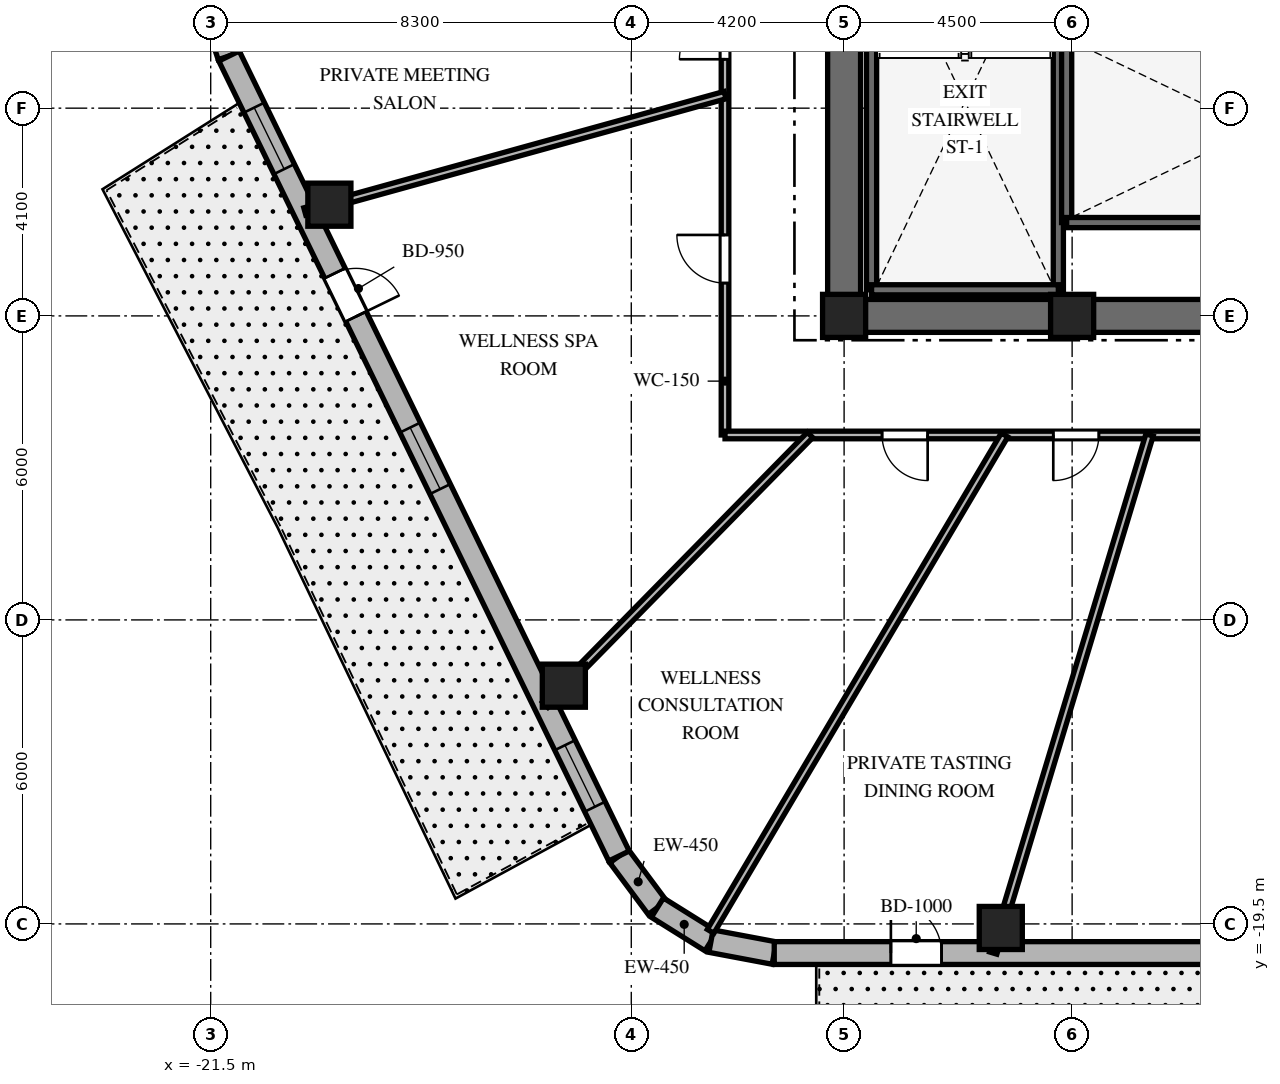
"""IFC4 building model, lengths in metres.
Left out: names, types, materials, properties, quantities, classifications, styles, units other than length and angle.
Written with IfcOpenShell. Run it as: python <this file> out.ifc"""

import sys

from ifc_helpers import new_model, si_unit, direction, frame, frame_2d, origin, origin_2d, place, context, subcontext, project, spatial, rectangle, extrude, element, fill, save


model = new_model("IFC4")
c1 = context("Model", 3, precision=1e-05, world=origin(), true_north=direction((0.0, 1.0)))
c2 = subcontext(c1, "Body", "Model", "MODEL_VIEW")
j1 = project(units=[si_unit("LENGTHUNIT", "METRE"), si_unit("PLANEANGLEUNIT", "RADIAN")], contexts=[c1])
p1 = place(None, origin())
s1 = spatial("IfcSite", under=j1, at=p1, CompositionType="ELEMENT")
p2 = place(p1, origin())
s2 = spatial("IfcBuilding", under=s1, at=p2, CompositionType="ELEMENT")
p3 = place(p2, frame((0.0, 0.0, 280.8)))
s3 = spatial("IfcBuildingStorey", under=s2, at=p3, CompositionType="ELEMENT", Elevation=280.8)
p4 = place(p3, frame((-9.325, -7.5, 0.0), z_axis=(0.0, 0.0, 1.0), x_axis=(1.0, 0.0, 0.0)))
e1 = element("IfcWall", 1, at=p4, inside=s3, PredefinedType="SHEAR", context=c2, shape_type="SweptSolid", body=[
    extrude(rectangle(XDim=18.65, YDim=0.65, at=frame_2d((9.325, 0.0))), origin(), (0.0, 0.0, 1.0), 3.9),
])
p5 = place(p4, frame((9.375, 0.0, 0.0)))
e2 = element("IfcOpeningElement", 2, at=p5, cuts=e1, PredefinedType="OPENING", context=c2, shape_type="SweptSolid", body=[
    extrude(rectangle(XDim=1.0, YDim=2.15, at=frame_2d((0.5, 1.075))), frame((0.0, 0.335, 0.0), z_axis=(0.0, -1.0, 0.0), x_axis=(1.0, 0.0, 0.0)), (0.0, 0.0, 1.0), 0.67),
])
p6 = place(p3, frame((-9.0, -7.175, 0.0), z_axis=(0.0, 0.0, 1.0), x_axis=(0.0, 1.0, 0.0)))
e3 = element("IfcWall", 3, at=p6, inside=s3, PredefinedType="SHEAR", context=c2, shape_type="SweptSolid", body=[
    extrude(rectangle(XDim=14.35, YDim=0.65, at=frame_2d((7.175, 0.0))), origin(), (0.0, 0.0, 1.0), 3.9),
])
p7 = place(p6, frame((10.3, 0.0, 0.0)))
e4 = element("IfcOpeningElement", 4, at=p7, cuts=e3, PredefinedType="OPENING", context=c2, shape_type="SweptSolid", body=[
    extrude(rectangle(XDim=1.05, YDim=2.15, at=frame_2d((0.525, 1.075))), frame((0.0, 0.335, 0.0), z_axis=(0.0, -1.0, 0.0), x_axis=(1.0, 0.0, 0.0)), (0.0, 0.0, 1.0), 0.67),
])
for number, where, z_axis, x_axis in (
    (5, (-8.458, -6.985, 0.0), (0.0, 0.0, 1.0), (0.0, 1.0, 0.0)),
    (6, (-4.772, -6.985, 0.0), (0.0, 0.0, 1.0), (0.0, 1.0, 0.0)),
):
    element("IfcWall", number, at=place(p3, frame(where, z_axis=z_axis, x_axis=x_axis)), inside=s3, PredefinedType="SHEAR", context=c2, shape_type="SweptSolid", body=[
        extrude(rectangle(XDim=9.143, YDim=0.2, at=frame_2d((4.572, 0.0))), origin(), (0.0, 0.0, 1.0), 3.9),
    ])
for number, where, z_axis, x_axis in (
    (7, (-8.458, -6.985, 0.0), (0.0, 0.0, 1.0), (1.0, 0.0, 0.0)),
    (8, (-4.608, -5.658, 0.0), (0.0, 0.0, 1.0), (0.0, 1.0, 0.0)),
):
    element("IfcWall", number, at=place(p3, frame(where, z_axis=z_axis, x_axis=x_axis)), inside=s3, PredefinedType="SHEAR", context=c2, shape_type="SweptSolid", body=[
        extrude(rectangle(XDim=3.686, YDim=0.2, at=frame_2d((1.843, 0.0))), origin(), (0.0, 0.0, 1.0), 3.9),
    ])
p8 = place(p3, frame((-4.608, -5.658, 0.0), z_axis=(0.0, 0.0, 1.0), x_axis=(1.0, 0.0, 0.0)))
e9 = element("IfcWall", 9, at=p8, inside=s3, PredefinedType="SHEAR", context=c2, shape_type="SweptSolid", body=[
    extrude(rectangle(XDim=9.166, YDim=0.2, at=frame_2d((4.583, 0.0))), origin(), (0.0, 0.0, 1.0), 3.9),
])
p9 = place(p8, frame((7.45, 0.0, 0.0)))
e10 = element("IfcOpeningElement", 10, at=p9, cuts=e9, PredefinedType="OPENING", context=c2, shape_type="SweptSolid", body=[
    extrude(rectangle(XDim=1.0, YDim=2.15, at=frame_2d((0.5, 1.075))), frame((0.0, 0.11, 0.0), z_axis=(0.0, -1.0, 0.0), x_axis=(1.0, 0.0, 0.0)), (0.0, 0.0, 1.0), 0.22),
])
for number, where, z_axis, x_axis in (
    (11, (-9.0, -7.5, 0.0), (0.0, 0.0, 1.0), (1.0, 0.0, 0.0)),
    (12, (-4.5, -7.5, 0.0), (0.0, 0.0, 1.0), (1.0, 0.0, 0.0)),
    (13, (-5.908, -19.58, 0.0), (0.0, 0.0, 1.0), (1.0, 0.0, 0.0)),
    (14, (-19.158, -5.305, 0.0), (0.0, 0.0, 1.0), (1.0, 0.0, 0.0)),
    (15, (-14.531, -14.798, 0.0), (0.0, 0.0, 1.0), (1.0, 0.0, 0.0)),
):
    element("IfcColumn", number, at=place(p3, frame(where, z_axis=z_axis, x_axis=x_axis)), inside=s3, PredefinedType="COLUMN", context=c2, shape_type="SweptSolid", body=[
        extrude(rectangle(XDim=0.85, YDim=0.85, at=origin_2d()), origin(), (0.0, 0.0, 1.0), 3.9),
    ])
p10 = place(p3, frame((-13.443, -18.16, 0.0), z_axis=(0.0, 0.0, 1.0), x_axis=(0.597042425808, -0.802209661987, 0.0)))
e16 = element("IfcWall", 16, at=p10, inside=s3, PredefinedType="SOLIDWALL", context=c2, shape_type="SweptSolid", body=[
    extrude(rectangle(XDim=1.27, YDim=0.45, at=frame_2d((0.635, 0.0))), origin(), (0.0, 0.0, 1.0), 3.6),
])
p11 = place(p3, frame((-12.685, -19.178, 0.0), z_axis=(0.0, 0.0, 1.0), x_axis=(0.848031272749, -0.529946186362, 0.0)))
e17 = element("IfcWall", 17, at=p11, inside=s3, PredefinedType="SOLIDWALL", context=c2, shape_type="SweptSolid", body=[
    extrude(rectangle(XDim=1.248, YDim=0.45, at=frame_2d((0.624, 0.0))), origin(), (0.0, 0.0, 1.0), 3.6),
])
p12 = place(p3, frame((-11.626, -19.84, 0.0), z_axis=(0.0, 0.0, 1.0), x_axis=(0.982701956681, -0.185194126083, 0.0)))
e18 = element("IfcWall", 18, at=p12, inside=s3, PredefinedType="SOLIDWALL", context=c2, shape_type="SweptSolid", body=[
    extrude(rectangle(XDim=1.27, YDim=0.45, at=frame_2d((0.635, 0.0))), origin(), (0.0, 0.0, 1.0), 3.6),
])
p13 = place(p3, frame((-21.422, -1.522, 0.0), z_axis=(0.0, 0.0, 1.0), x_axis=(0.316964162323, -0.94843751497, 0.0)))
e19 = element("IfcWall", 19, at=p13, inside=s3, PredefinedType="SOLIDWALL", context=c2, shape_type="SweptSolid", body=[
    extrude(rectangle(XDim=0.895, YDim=0.45, at=frame_2d((0.448, 0.0))), origin(), (0.0, 0.0, 1.0), 3.6),
])
p14 = place(p3, frame((-10.379, -20.075, 0.0), z_axis=(0.0, 0.0, 1.0), x_axis=(1.0, 0.0, 0.0)))
e20 = element("IfcWall", 20, at=p14, inside=s3, PredefinedType="SOLIDWALL", context=c2, shape_type="SweptSolid", body=[
    extrude(rectangle(XDim=22.417, YDim=0.45, at=frame_2d((11.208, 0.0))), origin(), (0.0, 0.0, 1.0), 3.6),
])
p15 = place(p14, frame((2.302, 0.0, 0.0)))
e21 = element("IfcOpeningElement", 21, at=p15, cuts=e20, PredefinedType="OPENING", context=c2, shape_type="SweptSolid", body=[
    extrude(rectangle(XDim=1.0, YDim=2.15, at=frame_2d((0.5, 1.075))), frame((0.0, 0.235, 0.0), z_axis=(0.0, -1.0, 0.0), x_axis=(1.0, 0.0, 0.0)), (0.0, 0.0, 1.0), 0.47),
])
p16 = place(p14, frame((10.534, 0.0, 0.8)))
e22 = element("IfcOpeningElement", 22, at=p16, cuts=e20, PredefinedType="OPENING", context=c2, shape_type="SweptSolid", body=[
    extrude(rectangle(XDim=1.35, YDim=1.75, at=frame_2d((0.675, 0.875))), frame((0.0, 0.235, 0.0), z_axis=(0.0, -1.0, 0.0), x_axis=(1.0, 0.0, 0.0)), (0.0, 0.0, 1.0), 0.47),
])
p17 = place(p14, frame((19.587, 0.0, 0.8)))
e23 = element("IfcOpeningElement", 23, at=p17, cuts=e20, PredefinedType="OPENING", context=c2, shape_type="SweptSolid", body=[
    extrude(rectangle(XDim=1.35, YDim=1.75, at=frame_2d((0.675, 0.875))), frame((0.0, 0.235, 0.0), z_axis=(0.0, -1.0, 0.0), x_axis=(1.0, 0.0, 0.0)), (0.0, 0.0, 1.0), 0.47),
])
p18 = place(p3, frame((-21.138, -2.371, 0.0), z_axis=(0.0, 0.0, 1.0), x_axis=(0.438128124058, -0.89891253574, 0.0)))
e24 = element("IfcWall", 24, at=p18, inside=s3, PredefinedType="SOLIDWALL", context=c2, shape_type="SweptSolid", body=[
    extrude(rectangle(XDim=17.565, YDim=0.45, at=frame_2d((8.782, 0.0))), origin(), (0.0, 0.0, 1.0), 3.6),
])
p19 = place(p18, frame((4.769, 0.0, 0.0)))
e25 = element("IfcOpeningElement", 25, at=p19, cuts=e24, PredefinedType="OPENING", context=c2, shape_type="SweptSolid", body=[
    extrude(rectangle(XDim=0.95, YDim=2.15, at=frame_2d((0.475, 1.075))), frame((0.0, 0.235, 0.0), z_axis=(0.0, -1.0, 0.0), x_axis=(1.0, 0.0, 0.0)), (0.0, 0.0, 1.0), 0.47),
])
p20 = place(p18, frame((1.133, 0.0, 0.8)))
e26 = element("IfcOpeningElement", 26, at=p20, cuts=e24, PredefinedType="OPENING", context=c2, shape_type="SweptSolid", body=[
    extrude(rectangle(XDim=1.35, YDim=1.75, at=frame_2d((0.675, 0.875))), frame((0.0, 0.235, 0.0), z_axis=(0.0, -1.0, 0.0), x_axis=(1.0, 0.0, 0.0)), (0.0, 0.0, 1.0), 0.47),
])
p21 = place(p18, frame((8.158, 0.0, 0.8)))
e27 = element("IfcOpeningElement", 27, at=p21, cuts=e24, PredefinedType="OPENING", context=c2, shape_type="SweptSolid", body=[
    extrude(rectangle(XDim=1.35, YDim=1.75, at=frame_2d((0.675, 0.875))), frame((0.0, 0.235, 0.0), z_axis=(0.0, -1.0, 0.0), x_axis=(1.0, 0.0, 0.0)), (0.0, 0.0, 1.0), 0.47),
])
p22 = place(p18, frame((15.132, 0.0, 0.8)))
e28 = element("IfcOpeningElement", 28, at=p22, cuts=e24, PredefinedType="OPENING", context=c2, shape_type="SweptSolid", body=[
    extrude(rectangle(XDim=1.35, YDim=1.75, at=frame_2d((0.675, 0.875))), frame((0.0, 0.235, 0.0), z_axis=(0.0, -1.0, 0.0), x_axis=(1.0, 0.0, 0.0)), (0.0, 0.0, 1.0), 0.47),
])
p23 = place(p3, frame((-11.35, -9.85, 0.0), z_axis=(0.0, 0.0, 1.0), x_axis=(0.0, 1.0, 0.0)))
e29 = element("IfcWall", 29, at=p23, inside=s3, PredefinedType="PARTITIONING", context=c2, shape_type="SweptSolid", body=[
    extrude(rectangle(XDim=12.4, YDim=0.15, at=frame_2d((6.2, 0.0))), origin(), (0.0, 0.0, 1.0), 3.09),
])
p24 = place(p23, frame((10.026, 0.0, 0.0)))
e30 = element("IfcOpeningElement", 30, at=p24, cuts=e29, PredefinedType="OPENING", context=c2, shape_type="SweptSolid", body=[
    extrude(rectangle(XDim=0.9, YDim=2.03, at=frame_2d((0.45, 1.015))), frame((0.0, 0.085, 0.0), z_axis=(0.0, -1.0, 0.0), x_axis=(1.0, 0.0, 0.0)), (0.0, 0.0, 1.0), 0.17),
])
p25 = place(p23, frame((7.415, 0.0, 0.0)))
e31 = element("IfcOpeningElement", 31, at=p25, cuts=e29, PredefinedType="OPENING", context=c2, shape_type="SweptSolid", body=[
    extrude(rectangle(XDim=0.9, YDim=2.03, at=frame_2d((0.45, 1.015))), frame((0.0, 0.085, 0.0), z_axis=(0.0, -1.0, 0.0), x_axis=(1.0, 0.0, 0.0)), (0.0, 0.0, 1.0), 0.17),
])
p26 = place(p23, frame((2.998, 0.0, 0.0)))
e32 = element("IfcOpeningElement", 32, at=p26, cuts=e29, PredefinedType="OPENING", context=c2, shape_type="SweptSolid", body=[
    extrude(rectangle(XDim=0.95, YDim=2.03, at=frame_2d((0.475, 1.015))), frame((0.0, 0.085, 0.0), z_axis=(0.0, -1.0, 0.0), x_axis=(1.0, 0.0, 0.0)), (0.0, 0.0, 1.0), 0.17),
])
p27 = place(p3, frame((-0.92, -9.85, 0.0), z_axis=(0.0, 0.0, 1.0), x_axis=(-1.0, 0.0, 0.0)))
e33 = element("IfcWall", 33, at=p27, inside=s3, PredefinedType="PARTITIONING", context=c2, shape_type="SweptSolid", body=[
    extrude(rectangle(XDim=10.43, YDim=0.15, at=frame_2d((5.215, 0.0))), origin(), (0.0, 0.0, 1.0), 3.09),
])
p28 = place(p27, frame((6.431, 0.0, 0.0)))
e34 = element("IfcOpeningElement", 34, at=p28, cuts=e33, PredefinedType="OPENING", context=c2, shape_type="SweptSolid", body=[
    extrude(rectangle(XDim=0.9, YDim=2.03, at=frame_2d((0.45, 1.015))), frame((0.0, 0.085, 0.0), z_axis=(0.0, -1.0, 0.0), x_axis=(1.0, 0.0, 0.0)), (0.0, 0.0, 1.0), 0.17),
])
p29 = place(p27, frame((3.052, 0.0, 0.0)))
e35 = element("IfcOpeningElement", 35, at=p29, cuts=e33, PredefinedType="OPENING", context=c2, shape_type="SweptSolid", body=[
    extrude(rectangle(XDim=0.9, YDim=2.03, at=frame_2d((0.45, 1.015))), frame((0.0, 0.085, 0.0), z_axis=(0.0, -1.0, 0.0), x_axis=(1.0, 0.0, 0.0)), (0.0, 0.0, 1.0), 0.17),
])
p30 = place(p3, frame((-11.35, -3.143, 0.0), z_axis=(0.0, 0.0, 1.0), x_axis=(-0.963731818141, -0.266872596386, 0.0)))
e36 = element("IfcWall", 36, at=p30, inside=s3, PredefinedType="PARTITIONING", context=c2, shape_type="SweptSolid", body=[
    extrude(rectangle(XDim=8.605, YDim=0.15, at=frame_2d((4.302, 0.0))), origin(), (0.0, 0.0, 1.0), 2.94),
])
p31 = place(p3, frame((-9.672, -9.85, 0.0), z_axis=(0.0, 0.0, 1.0), x_axis=(-0.700629771301, -0.713524998558, 0.0)))
e37 = element("IfcWall", 37, at=p31, inside=s3, PredefinedType="PARTITIONING", context=c2, shape_type="SweptSolid", body=[
    extrude(rectangle(XDim=7.459, YDim=0.15, at=frame_2d((3.73, 0.0))), origin(), (0.0, 0.0, 1.0), 2.94),
])
p32 = place(p3, frame((-5.833, -9.85, 0.0), z_axis=(0.0, 0.0, 1.0), x_axis=(-0.509561365941, -0.860434317272, 0.0)))
e38 = element("IfcWall", 38, at=p32, inside=s3, PredefinedType="PARTITIONING", context=c2, shape_type="SweptSolid", body=[
    extrude(rectangle(XDim=11.385, YDim=0.15, at=frame_2d((5.692, 0.0))), origin(), (0.0, 0.0, 1.0), 2.94),
])
p33 = place(p3, frame((-2.972, -9.85, 0.0), z_axis=(0.0, 0.0, 1.0), x_axis=(-0.288872169679, -0.957367677324, 0.0)))
e39 = element("IfcWall", 39, at=p33, inside=s3, PredefinedType="PARTITIONING", context=c2, shape_type="SweptSolid", body=[
    extrude(rectangle(XDim=10.68, YDim=0.15, at=frame_2d((5.34, 0.0))), origin(), (0.0, 0.0, 1.0), 2.94),
])
p34 = place(p15, origin())
e40 = element("IfcDoor", 40, at=p34, inside=s3, OperationType="SINGLE_SWING_LEFT", PredefinedType="DOOR", context=c2, shape_type="SweptSolid", body=[
    extrude(rectangle(XDim=1.0, YDim=2.15, at=frame_2d((0.5, 1.075))), frame((0.0, 0.025, 0.0), z_axis=(0.0, -1.0, 0.0), x_axis=(1.0, 0.0, 0.0)), (0.0, 0.0, 1.0), 0.05),
])
fill(e21, e40)
p35 = place(p19, origin())
e41 = element("IfcDoor", 41, at=p35, inside=s3, OperationType="SINGLE_SWING_RIGHT", PredefinedType="DOOR", context=c2, shape_type="SweptSolid", body=[
    extrude(rectangle(XDim=0.95, YDim=2.15, at=frame_2d((0.475, 1.075))), frame((0.0, 0.025, 0.0), z_axis=(0.0, -1.0, 0.0), x_axis=(1.0, 0.0, 0.0)), (0.0, 0.0, 1.0), 0.05),
])
fill(e25, e41)
p36 = place(p20, origin())
e42 = element("IfcWindow", 42, at=p36, inside=s3, PartitioningType="SINGLE_PANEL", PredefinedType="WINDOW", context=c2, shape_type="SweptSolid", body=[
    extrude(rectangle(XDim=1.35, YDim=1.75, at=frame_2d((0.675, 0.875))), frame((0.0, 0.03, 0.0), z_axis=(0.0, -1.0, 0.0), x_axis=(1.0, 0.0, 0.0)), (0.0, 0.0, 1.0), 0.06),
])
fill(e26, e42)
p37 = place(p21, origin())
e43 = element("IfcWindow", 43, at=p37, inside=s3, PartitioningType="SINGLE_PANEL", PredefinedType="WINDOW", context=c2, shape_type="SweptSolid", body=[
    extrude(rectangle(XDim=1.35, YDim=1.75, at=frame_2d((0.675, 0.875))), frame((0.0, 0.03, 0.0), z_axis=(0.0, -1.0, 0.0), x_axis=(1.0, 0.0, 0.0)), (0.0, 0.0, 1.0), 0.06),
])
fill(e27, e43)
p38 = place(p22, origin())
e44 = element("IfcWindow", 44, at=p38, inside=s3, PartitioningType="SINGLE_PANEL", PredefinedType="WINDOW", context=c2, shape_type="SweptSolid", body=[
    extrude(rectangle(XDim=1.35, YDim=1.75, at=frame_2d((0.675, 0.875))), frame((0.0, 0.03, 0.0), z_axis=(0.0, -1.0, 0.0), x_axis=(1.0, 0.0, 0.0)), (0.0, 0.0, 1.0), 0.06),
])
fill(e28, e44)
p39 = place(p25, origin())
e45 = element("IfcDoor", 45, at=p39, inside=s3, OperationType="SINGLE_SWING_LEFT", PredefinedType="DOOR", context=c2, shape_type="SweptSolid", body=[
    extrude(rectangle(XDim=0.9, YDim=2.03, at=frame_2d((0.45, 1.015))), frame((0.0, 0.025, 0.0), z_axis=(0.0, -1.0, 0.0), x_axis=(1.0, 0.0, 0.0)), (0.0, 0.0, 1.0), 0.05),
])
fill(e31, e45)
p40 = place(p26, origin())
e46 = element("IfcDoor", 46, at=p40, inside=s3, OperationType="SINGLE_SWING_RIGHT", PredefinedType="DOOR", context=c2, shape_type="SweptSolid", body=[
    extrude(rectangle(XDim=0.95, YDim=2.03, at=frame_2d((0.475, 1.015))), frame((0.0, 0.025, 0.0), z_axis=(0.0, -1.0, 0.0), x_axis=(1.0, 0.0, 0.0)), (0.0, 0.0, 1.0), 0.05),
])
fill(e32, e46)
p41 = place(p28, origin())
e47 = element("IfcDoor", 47, at=p41, inside=s3, OperationType="SINGLE_SWING_LEFT", PredefinedType="DOOR", context=c2, shape_type="SweptSolid", body=[
    extrude(rectangle(XDim=0.9, YDim=2.03, at=frame_2d((0.45, 1.015))), frame((0.0, 0.025, 0.0), z_axis=(0.0, -1.0, 0.0), x_axis=(1.0, 0.0, 0.0)), (0.0, 0.0, 1.0), 0.05),
])
fill(e34, e47)
p42 = place(p29, origin())
e48 = element("IfcDoor", 48, at=p42, inside=s3, OperationType="SINGLE_SWING_RIGHT", PredefinedType="DOOR", context=c2, shape_type="SweptSolid", body=[
    extrude(rectangle(XDim=0.9, YDim=2.03, at=frame_2d((0.45, 1.015))), frame((0.0, 0.025, 0.0), z_axis=(0.0, -1.0, 0.0), x_axis=(1.0, 0.0, 0.0)), (0.0, 0.0, 1.0), 0.05),
])
fill(e35, e48)
save(model, sys.argv[1])
